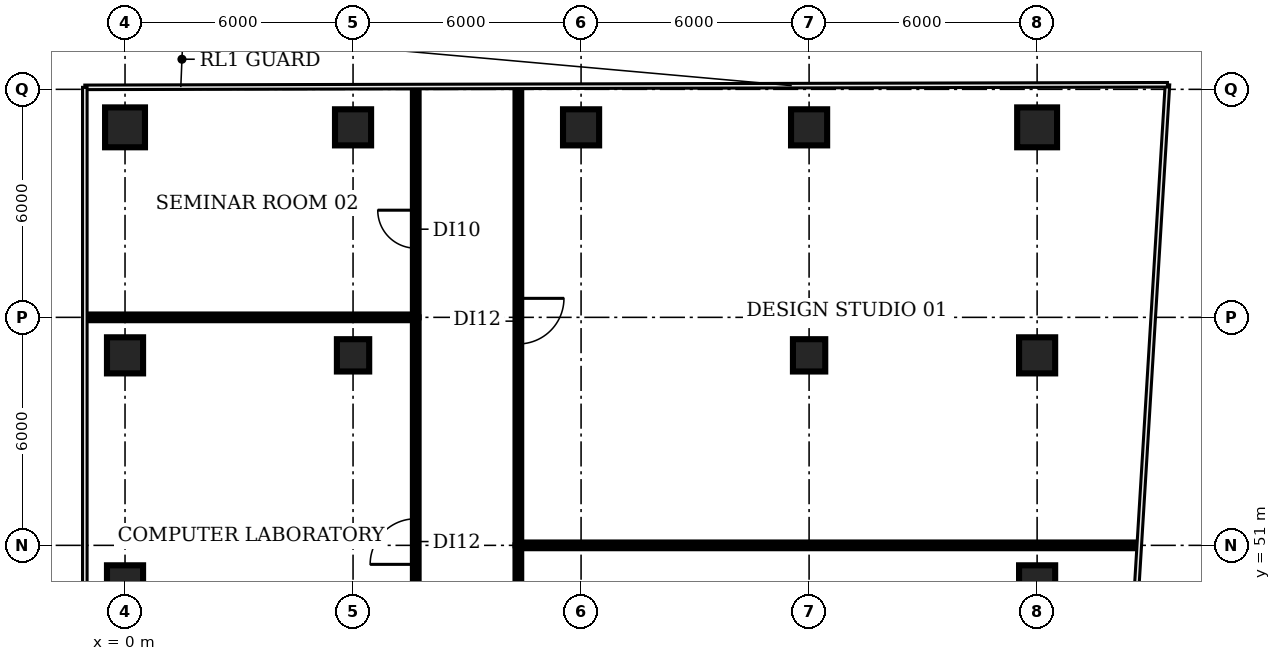
"""IFC4 building model, lengths in metres.
Left out: names, types, materials, properties, quantities, classifications, styles, units other than length and angle.
Written with IfcOpenShell. Run it as: python <this file> out.ifc"""

import sys

from ifc_helpers import new_model, si_unit, direction, frame, frame_2d, origin, origin_2d, place, context, subcontext, project, spatial, rectangle, circle, extrude, element, fill, save


model = new_model("IFC4")
c1 = context("Model", 3, precision=1e-05, world=origin(), true_north=direction((0.0, 1.0)))
c2 = subcontext(c1, "Body", "Model", "MODEL_VIEW")
j1 = project(units=[si_unit("LENGTHUNIT", "METRE"), si_unit("PLANEANGLEUNIT", "RADIAN")], contexts=[c1])
p1 = place(None, origin())
s1 = spatial("IfcSite", under=j1, at=p1, CompositionType="ELEMENT")
p2 = place(p1, origin())
s2 = spatial("IfcBuilding", under=s1, at=p2, CompositionType="ELEMENT")
p3 = place(p2, frame((0.0, 0.0, 37.4)))
s3 = spatial("IfcBuildingStorey", under=s2, at=p3, CompositionType="ELEMENT", Elevation=37.4)
for number, where, z_axis, x_axis in (
    (1, (0.0, 50.0, 0.0), (0.0, 0.0, 1.0), (1.0, 0.0, 0.0)),
    (2, (0.0, 56.0, 0.0), (0.0, 0.0, 1.0), (1.0, 0.0, 0.0)),
):
    element("IfcColumn", number, at=place(p3, frame(where, z_axis=z_axis, x_axis=x_axis)), inside=s3, PredefinedType="COLUMN", context=c2, shape_type="SweptSolid", body=[
        extrude(rectangle(XDim=0.95, YDim=0.95, at=origin_2d()), origin(), (0.0, 0.0, 1.0), 3.85),
    ])
p4 = place(p3, frame((0.0, 62.0, 0.0), z_axis=(0.0, 0.0, 1.0), x_axis=(1.0, 0.0, 0.0)))
e3 = element("IfcColumn", 3, at=p4, inside=s3, PredefinedType="COLUMN", context=c2, shape_type="SweptSolid", body=[
    extrude(circle(Radius=0.525, at=origin_2d()), origin(), (0.0, 0.0, 1.0), 3.85),
])
p5 = place(p3, frame((6.0, 56.0, 0.0), z_axis=(0.0, 0.0, 1.0), x_axis=(1.0, 0.0, 0.0)))
e4 = element("IfcColumn", 4, at=p5, inside=s3, PredefinedType="COLUMN", context=c2, shape_type="SweptSolid", body=[
    extrude(rectangle(XDim=0.85, YDim=0.85, at=origin_2d()), origin(), (0.0, 0.0, 1.0), 3.85),
])
for number, where, z_axis, x_axis in (
    (5, (6.0, 62.0, 0.0), (0.0, 0.0, 1.0), (1.0, 0.0, 0.0)),
    (6, (12.0, 62.0, 0.0), (0.0, 0.0, 1.0), (1.0, 0.0, 0.0)),
):
    element("IfcColumn", number, at=place(p3, frame(where, z_axis=z_axis, x_axis=x_axis)), inside=s3, PredefinedType="COLUMN", context=c2, shape_type="SweptSolid", body=[
        extrude(rectangle(XDim=0.95, YDim=0.95, at=origin_2d()), origin(), (0.0, 0.0, 1.0), 3.85),
    ])
p6 = place(p3, frame((18.0, 56.0, 0.0), z_axis=(0.0, 0.0, 1.0), x_axis=(1.0, 0.0, 0.0)))
e7 = element("IfcColumn", 7, at=p6, inside=s3, PredefinedType="COLUMN", context=c2, shape_type="SweptSolid", body=[
    extrude(rectangle(XDim=0.85, YDim=0.85, at=origin_2d()), origin(), (0.0, 0.0, 1.0), 3.85),
])
for number, where, z_axis, x_axis in (
    (8, (18.0, 62.0, 0.0), (0.0, 0.0, 1.0), (1.0, 0.0, 0.0)),
    (9, (24.0, 50.0, 0.0), (0.0, 0.0, 1.0), (1.0, 0.0, 0.0)),
    (10, (24.0, 56.0, 0.0), (0.0, 0.0, 1.0), (1.0, 0.0, 0.0)),
):
    element("IfcColumn", number, at=place(p3, frame(where, z_axis=z_axis, x_axis=x_axis)), inside=s3, PredefinedType="COLUMN", context=c2, shape_type="SweptSolid", body=[
        extrude(rectangle(XDim=0.95, YDim=0.95, at=origin_2d()), origin(), (0.0, 0.0, 1.0), 3.85),
    ])
p7 = place(p3, frame((24.0, 62.0, 0.0), z_axis=(0.0, 0.0, 1.0), x_axis=(1.0, 0.0, 0.0)))
e11 = element("IfcColumn", 11, at=p7, inside=s3, PredefinedType="COLUMN", context=c2, shape_type="SweptSolid", body=[
    extrude(circle(Radius=0.525, at=origin_2d()), origin(), (0.0, 0.0, 1.0), 3.85),
])
p8 = place(p3, frame((-1.01, 57.0, 0.0), z_axis=(0.0, 0.0, 1.0), x_axis=(1.0, 0.0, 0.0)))
e12 = element("IfcWall", 12, at=p8, inside=s3, PredefinedType="PARTITIONING", context=c2, shape_type="SweptSolid", body=[
    extrude(rectangle(XDim=8.66, YDim=0.15, at=frame_2d((4.33, 0.0))), origin(), (0.0, 0.0, 1.0), 2.83),
])
p9 = place(p3, frame((7.65, 45.0, 0.0), z_axis=(0.0, 0.0, 1.0), x_axis=(0.0, 1.0, 0.0)))
e13 = element("IfcWall", 13, at=p9, inside=s3, PredefinedType="PARTITIONING", context=c2, shape_type="SweptSolid", body=[
    extrude(rectangle(XDim=12.0, YDim=0.15, at=frame_2d((6.0, 0.0))), origin(), (0.0, 0.0, 1.0), 2.83),
])
p10 = place(p9, frame((5.5, 0.0, 0.0)))
e14 = element("IfcOpeningElement", 14, at=p10, cuts=e13, PredefinedType="OPENING", context=c2, shape_type="SweptSolid", body=[
    extrude(rectangle(XDim=1.2, YDim=2.1, at=frame_2d((0.6, 1.05))), frame((0.0, 0.085, 0.0), z_axis=(0.0, -1.0, 0.0), x_axis=(1.0, 0.0, 0.0)), (0.0, 0.0, 1.0), 0.17),
])
p11 = place(p3, frame((7.65, 57.0, 0.0), z_axis=(0.0, 0.0, 1.0), x_axis=(0.0, 1.0, 0.0)))
e15 = element("IfcWall", 15, at=p11, inside=s3, PredefinedType="PARTITIONING", context=c2, shape_type="SweptSolid", body=[
    extrude(rectangle(XDim=6.02, YDim=0.15, at=frame_2d((3.01, 0.0))), origin(), (0.0, 0.0, 1.0), 2.83),
])
p12 = place(p11, frame((1.82, 0.0, 0.0)))
e16 = element("IfcOpeningElement", 16, at=p12, cuts=e15, PredefinedType="OPENING", context=c2, shape_type="SweptSolid", body=[
    extrude(rectangle(XDim=1.0, YDim=2.1, at=frame_2d((0.5, 1.05))), frame((0.0, 0.085, 0.0), z_axis=(0.0, -1.0, 0.0), x_axis=(1.0, 0.0, 0.0)), (0.0, 0.0, 1.0), 0.17),
])
p13 = place(p3, frame((10.35, 51.0, 0.0), z_axis=(0.0, 0.0, 1.0), x_axis=(0.0, -1.0, 0.0)))
e17 = element("IfcWall", 17, at=p13, inside=s3, PredefinedType="PARTITIONING", context=c2, shape_type="SweptSolid", body=[
    extrude(rectangle(XDim=6.0, YDim=0.15, at=frame_2d((3.0, 0.0))), origin(), (0.0, 0.0, 1.0), 2.83),
])
p14 = place(p13, frame((2.4, 0.0, 0.0)))
e18 = element("IfcOpeningElement", 18, at=p14, cuts=e17, PredefinedType="OPENING", context=c2, shape_type="SweptSolid", body=[
    extrude(rectangle(XDim=1.0, YDim=2.1, at=frame_2d((0.5, 1.05))), frame((0.0, 0.085, 0.0), z_axis=(0.0, -1.0, 0.0), x_axis=(1.0, 0.0, 0.0)), (0.0, 0.0, 1.0), 0.17),
])
p15 = place(p3, frame((10.35, 51.0, 0.0), z_axis=(0.0, 0.0, 1.0), x_axis=(1.0, 0.0, 0.0)))
e19 = element("IfcWall", 19, at=p15, inside=s3, PredefinedType="PARTITIONING", context=c2, shape_type="SweptSolid", body=[
    extrude(rectangle(XDim=16.269, YDim=0.15, at=frame_2d((8.134, 0.0))), origin(), (0.0, 0.0, 1.0), 2.83),
])
p16 = place(p3, frame((10.35, 63.015, 0.0), z_axis=(0.0, 0.0, 1.0), x_axis=(0.0, -1.0, 0.0)))
e20 = element("IfcWall", 20, at=p16, inside=s3, PredefinedType="PARTITIONING", context=c2, shape_type="SweptSolid", body=[
    extrude(rectangle(XDim=12.015, YDim=0.15, at=frame_2d((6.007, 0.0))), origin(), (0.0, 0.0, 1.0), 2.83),
])
p17 = place(p16, frame((5.515, 0.0, 0.0)))
e21 = element("IfcOpeningElement", 21, at=p17, cuts=e20, PredefinedType="OPENING", context=c2, shape_type="SweptSolid", body=[
    extrude(rectangle(XDim=1.2, YDim=2.1, at=frame_2d((0.6, 1.05))), frame((0.0, 0.085, 0.0), z_axis=(0.0, -1.0, 0.0), x_axis=(1.0, 0.0, 0.0)), (0.0, 0.0, 1.0), 0.17),
])
p18 = place(p10, origin())
e22 = element("IfcDoor", 22, at=p18, inside=s3, OperationType="SINGLE_SWING_LEFT", PredefinedType="DOOR", context=c2, shape_type="SweptSolid", body=[
    extrude(rectangle(XDim=1.2, YDim=2.1, at=frame_2d((0.6, 1.05))), frame((0.0, 0.025, 0.0), z_axis=(0.0, -1.0, 0.0), x_axis=(1.0, 0.0, 0.0)), (0.0, 0.0, 1.0), 0.05),
])
fill(e14, e22)
p19 = place(p12, origin())
e23 = element("IfcDoor", 23, at=p19, inside=s3, OperationType="SINGLE_SWING_RIGHT", PredefinedType="DOOR", context=c2, shape_type="SweptSolid", body=[
    extrude(rectangle(XDim=1.0, YDim=2.1, at=frame_2d((0.5, 1.05))), frame((0.0, 0.025, 0.0), z_axis=(0.0, -1.0, 0.0), x_axis=(1.0, 0.0, 0.0)), (0.0, 0.0, 1.0), 0.05),
])
fill(e16, e23)
p20 = place(p17, origin())
e24 = element("IfcDoor", 24, at=p20, inside=s3, OperationType="SINGLE_SWING_LEFT", PredefinedType="DOOR", context=c2, shape_type="SweptSolid", body=[
    extrude(rectangle(XDim=1.2, YDim=2.1, at=frame_2d((0.6, 1.05))), frame((0.0, 0.025, 0.0), z_axis=(0.0, -1.0, 0.0), x_axis=(1.0, 0.0, 0.0)), (0.0, 0.0, 1.0), 0.05),
])
fill(e21, e24)
save(model, sys.argv[1])
